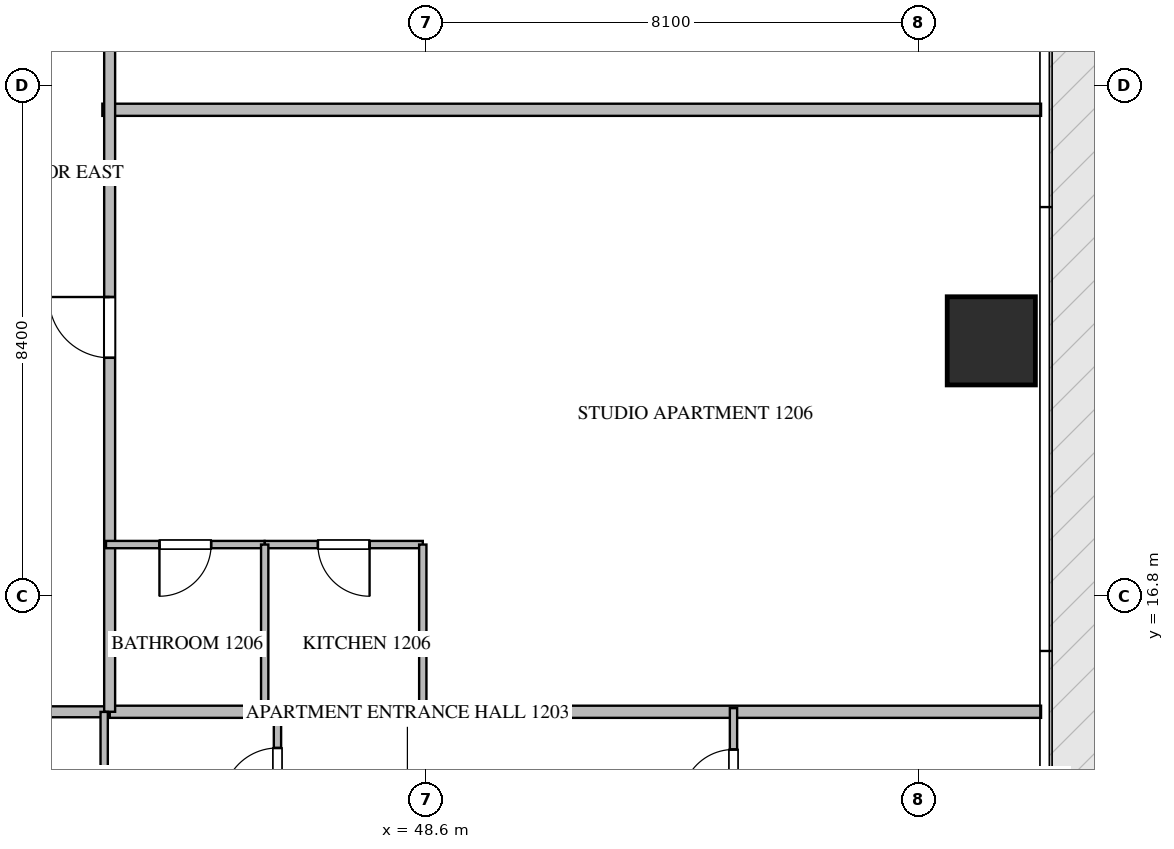
"""IFC4 building model, lengths in metres.
Left out: names, types, materials, properties, quantities, classifications, styles, units other than length and angle.
Written with IfcOpenShell. Run it as: python <this file> out.ifc"""

import sys

from ifc_helpers import new_model, si_unit, direction, frame, frame_2d, origin, origin_2d, place, context, subcontext, project, spatial, rectangle, extrude, source, transform, mapped, element, fill, save


model = new_model("IFC4")
c1 = context("Model", 3, precision=1e-05, world=origin(), true_north=direction((0.0, 1.0)))
c2 = subcontext(c1, "Body", "Model", "MODEL_VIEW")
j1 = project(units=[si_unit("LENGTHUNIT", "METRE"), si_unit("PLANEANGLEUNIT", "RADIAN")], contexts=[c1])
p1 = place(None, origin())
s1 = spatial("IfcSite", under=j1, at=p1, CompositionType="ELEMENT")
p2 = place(p1, origin())
s2 = spatial("IfcBuilding", under=s1, at=p2, CompositionType="ELEMENT")
p3 = place(p2, frame((0.0, 0.0, 52.95)))
s3 = spatial("IfcBuildingStorey", under=s2, at=p3, CompositionType="ELEMENT", Elevation=52.95)
m1 = source(origin(), c2, "Body", "SweptSolid", [
    extrude(rectangle(XDim=1.45, YDim=1.45, at=origin_2d()), origin(), (0.0, 0.0, 1.0), 3.75),
])
p4 = place(p3, frame((57.9, 21.0, -0.26), z_axis=(0.0, 0.0, 1.0), x_axis=(1.0, 0.0, 0.0)))
e1 = element("IfcColumn", 1, at=p4, inside=s3, PredefinedType="COLUMN", context=c2, shape_type="MappedRepresentation", body=[
    mapped(m1, transform((0.0, 0.0, 0.0), scale=1.0)),
])
p5 = place(p3, frame((43.28, 24.8, 0.0), z_axis=(0.0, 0.0, 1.0), x_axis=(1.0, 0.0, 0.0)))
e2 = element("IfcWall", 2, at=p5, inside=s3, PredefinedType="PARTITIONING", context=c2, shape_type="SweptSolid", body=[
    extrude(rectangle(XDim=15.438, YDim=0.2, at=frame_2d((7.719, 0.0))), origin(), (0.0, 0.0, 1.0), 3.49),
])
p6 = place(p3, frame((43.4, 14.9, 0.0), z_axis=(0.0, 0.0, 1.0), x_axis=(1.0, 0.0, 0.0)))
e3 = element("IfcWall", 3, at=p6, inside=s3, PredefinedType="PARTITIONING", context=c2, shape_type="SweptSolid", body=[
    extrude(rectangle(XDim=15.318, YDim=0.2, at=frame_2d((7.659, 0.0))), origin(), (0.0, 0.0, 1.0), 3.49),
])
p7 = place(p3, frame((21.402, 14.9, 0.0), z_axis=(0.0, 0.0, 1.0), x_axis=(1.0, 0.0, 0.0)))
e4 = element("IfcWall", 4, at=p7, inside=s3, PredefinedType="PARTITIONING", context=c2, shape_type="SweptSolid", body=[
    extrude(rectangle(XDim=21.996, YDim=0.18, at=frame_2d((10.998, 0.0))), origin(), (0.0, 0.0, 1.0), 3.49),
])
p8 = place(p7, frame((2.1, 0.0, 0.0)))
e5 = element("IfcOpeningElement", 5, at=p8, cuts=e4, PredefinedType="OPENING", context=c2, shape_type="SweptSolid", body=[
    extrude(rectangle(XDim=1.0, YDim=2.15, at=frame_2d((0.5, 1.075))), frame((0.0, 0.1, 0.0), z_axis=(0.0, -1.0, 0.0), x_axis=(1.0, 0.0, 0.0)), (0.0, 0.0, 1.0), 0.2),
])
p9 = place(p7, frame((14.172, 0.0, 0.0)))
e6 = element("IfcOpeningElement", 6, at=p9, cuts=e4, PredefinedType="OPENING", context=c2, shape_type="SweptSolid", body=[
    extrude(rectangle(XDim=1.0, YDim=2.15, at=frame_2d((0.5, 1.075))), frame((0.0, 0.1, 0.0), z_axis=(0.0, -1.0, 0.0), x_axis=(1.0, 0.0, 0.0)), (0.0, 0.0, 1.0), 0.2),
])
p10 = place(p7, frame((18.896, 0.0, 0.0)))
e7 = element("IfcOpeningElement", 7, at=p10, cuts=e4, PredefinedType="OPENING", context=c2, shape_type="SweptSolid", body=[
    extrude(rectangle(XDim=1.0, YDim=2.15, at=frame_2d((0.5, 1.075))), frame((0.0, 0.1, 0.0), z_axis=(0.0, -1.0, 0.0), x_axis=(1.0, 0.0, 0.0)), (0.0, 0.0, 1.0), 0.2),
])
p11 = place(p3, frame((43.4, 14.9, 0.0), z_axis=(0.0, 0.0, 1.0), x_axis=(0.0, 1.0, 0.0)))
e8 = element("IfcWall", 8, at=p11, inside=s3, PredefinedType="PARTITIONING", context=c2, shape_type="SweptSolid", body=[
    extrude(rectangle(XDim=20.6, YDim=0.18, at=frame_2d((10.3, 0.0))), origin(), (0.0, 0.0, 1.0), 3.49),
])
p12 = place(p11, frame((5.821, 0.0, 0.0)))
e9 = element("IfcOpeningElement", 9, at=p12, cuts=e8, PredefinedType="OPENING", context=c2, shape_type="SweptSolid", body=[
    extrude(rectangle(XDim=1.0, YDim=2.15, at=frame_2d((0.5, 1.075))), frame((0.0, 0.1, 0.0), z_axis=(0.0, -1.0, 0.0), x_axis=(1.0, 0.0, 0.0)), (0.0, 0.0, 1.0), 0.2),
])
p13 = place(p11, frame((10.898, 0.0, 0.0)))
e10 = element("IfcOpeningElement", 10, at=p13, cuts=e8, PredefinedType="OPENING", context=c2, shape_type="SweptSolid", body=[
    extrude(rectangle(XDim=1.0, YDim=2.15, at=frame_2d((0.5, 1.075))), frame((0.0, 0.1, 0.0), z_axis=(0.0, -1.0, 0.0), x_axis=(1.0, 0.0, 0.0)), (0.0, 0.0, 1.0), 0.2),
])
p14 = place(p3, frame((43.31, 12.15, 0.0), z_axis=(0.0, 0.0, 1.0), x_axis=(0.0, 1.0, 0.0)))
e11 = element("IfcWall", 11, at=p14, inside=s3, PredefinedType="PARTITIONING", context=c2, shape_type="SweptSolid", body=[
    extrude(rectangle(XDim=2.748, YDim=0.12, at=frame_2d((1.374, 0.0))), origin(), (0.0, 0.0, 1.0), 3.49),
])
p15 = place(p3, frame((46.16, 12.75, 0.0), z_axis=(0.0, 0.0, 1.0), x_axis=(0.0, 1.0, 0.0)))
e12 = element("IfcWall", 12, at=p15, inside=s3, PredefinedType="PARTITIONING", context=c2, shape_type="SweptSolid", body=[
    extrude(rectangle(XDim=2.21, YDim=0.12, at=frame_2d((1.105, 0.0))), origin(), (0.0, 0.0, 1.0), 3.49),
])
p16 = place(p15, frame((0.655, 0.0, 0.0)))
e13 = element("IfcOpeningElement", 13, at=p16, cuts=e12, PredefinedType="OPENING", context=c2, shape_type="SweptSolid", body=[
    extrude(rectangle(XDim=0.9, YDim=2.1, at=frame_2d((0.45, 1.05))), frame((0.0, 0.07, 0.0), z_axis=(0.0, -1.0, 0.0), x_axis=(1.0, 0.0, 0.0)), (0.0, 0.0, 1.0), 0.14),
])
p17 = place(p3, frame((53.66, 12.75, 0.0), z_axis=(0.0, 0.0, 1.0), x_axis=(0.0, 1.0, 0.0)))
e14 = element("IfcWall", 14, at=p17, inside=s3, PredefinedType="PARTITIONING", context=c2, shape_type="SweptSolid", body=[
    extrude(rectangle(XDim=2.21, YDim=0.12, at=frame_2d((1.105, 0.0))), origin(), (0.0, 0.0, 1.0), 3.49),
])
p18 = place(p17, frame((0.68, 0.0, 0.0)))
e15 = element("IfcOpeningElement", 15, at=p18, cuts=e14, PredefinedType="OPENING", context=c2, shape_type="SweptSolid", body=[
    extrude(rectangle(XDim=0.85, YDim=2.1, at=frame_2d((0.425, 1.05))), frame((0.0, 0.07, 0.0), z_axis=(0.0, -1.0, 0.0), x_axis=(1.0, 0.0, 0.0)), (0.0, 0.0, 1.0), 0.14),
])
p19 = place(p3, frame((48.55, 17.65, 0.0), z_axis=(0.0, 0.0, 1.0), x_axis=(-1.0, 0.0, 0.0)))
e16 = element("IfcWall", 16, at=p19, inside=s3, PredefinedType="PARTITIONING", context=c2, shape_type="SweptSolid", body=[
    extrude(rectangle(XDim=2.6, YDim=0.12, at=frame_2d((1.3, 0.0))), origin(), (0.0, 0.0, 1.0), 3.49),
])
p20 = place(p19, frame((0.875, 0.0, 0.0)))
e17 = element("IfcOpeningElement", 17, at=p20, cuts=e16, PredefinedType="OPENING", context=c2, shape_type="SweptSolid", body=[
    extrude(rectangle(XDim=0.85, YDim=2.1, at=frame_2d((0.425, 1.05))), frame((0.0, 0.07, 0.0), z_axis=(0.0, -1.0, 0.0), x_axis=(1.0, 0.0, 0.0)), (0.0, 0.0, 1.0), 0.14),
])
p21 = place(p3, frame((45.948, 17.65, 0.0), z_axis=(0.0, 0.0, 1.0), x_axis=(-1.0, 0.0, 0.0)))
e18 = element("IfcWall", 18, at=p21, inside=s3, PredefinedType="PARTITIONING", context=c2, shape_type="SweptSolid", body=[
    extrude(rectangle(XDim=2.608, YDim=0.12, at=frame_2d((1.304, 0.0))), origin(), (0.0, 0.0, 1.0), 3.49),
])
p22 = place(p21, frame((0.879, 0.0, 0.0)))
e19 = element("IfcOpeningElement", 19, at=p22, cuts=e18, PredefinedType="OPENING", context=c2, shape_type="SweptSolid", body=[
    extrude(rectangle(XDim=0.85, YDim=2.1, at=frame_2d((0.425, 1.05))), frame((0.0, 0.07, 0.0), z_axis=(0.0, -1.0, 0.0), x_axis=(1.0, 0.0, 0.0)), (0.0, 0.0, 1.0), 0.14),
])
for number, where, z_axis, x_axis in (
    (20, (45.95, 14.84, 0.0), (0.0, 0.0, 1.0), (0.0, 1.0, 0.0)),
    (21, (48.55, 14.84, 0.0), (0.0, 0.0, 1.0), (0.0, 1.0, 0.0)),
):
    element("IfcWall", number, at=place(p3, frame(where, z_axis=z_axis, x_axis=x_axis)), inside=s3, PredefinedType="PARTITIONING", context=c2, shape_type="SweptSolid", body=[
        extrude(rectangle(XDim=2.81, YDim=0.12, at=frame_2d((1.405, 0.0))), origin(), (0.0, 0.0, 1.0), 3.49),
    ])
m2 = source(origin(), c2, "Body", "SweptSolid", [
    extrude(rectangle(XDim=1.0, YDim=2.15, at=frame_2d((0.5, 1.075))), frame((0.0, 0.025, 0.0), z_axis=(0.0, -1.0, 0.0), x_axis=(1.0, 0.0, 0.0)), (0.0, 0.0, 1.0), 0.05),
])
p23 = place(p12, origin())
e22 = element("IfcDoor", 22, at=p23, inside=s3, OperationType="SINGLE_SWING_RIGHT", PredefinedType="DOOR", context=c2, shape_type="MappedRepresentation", body=[
    mapped(m2, transform((0.0, 0.0, 0.0), scale=1.0)),
])
fill(e9, e22)
m3 = source(origin(), c2, "Body", "SweptSolid", [
    extrude(rectangle(XDim=0.9, YDim=2.1, at=frame_2d((0.45, 1.05))), frame((0.0, 0.025, 0.0), z_axis=(0.0, -1.0, 0.0), x_axis=(1.0, 0.0, 0.0)), (0.0, 0.0, 1.0), 0.05),
])
p24 = place(p16, origin())
e23 = element("IfcDoor", 23, at=p24, inside=s3, OperationType="SINGLE_SWING_LEFT", PredefinedType="DOOR", context=c2, shape_type="MappedRepresentation", body=[
    mapped(m3, transform((0.0, 0.0, 0.0), scale=1.0)),
])
fill(e13, e23)
m4 = source(origin(), c2, "Body", "SweptSolid", [
    extrude(rectangle(XDim=0.85, YDim=2.1, at=frame_2d((0.425, 1.05))), frame((0.0, 0.025, 0.0), z_axis=(0.0, -1.0, 0.0), x_axis=(1.0, 0.0, 0.0)), (0.0, 0.0, 1.0), 0.05),
])
p25 = place(p18, origin())
e24 = element("IfcDoor", 24, at=p25, inside=s3, OperationType="SINGLE_SWING_LEFT", PredefinedType="DOOR", context=c2, shape_type="MappedRepresentation", body=[
    mapped(m4, transform((0.0, 0.0, 0.0), scale=1.0)),
])
fill(e15, e24)
p26 = place(p20, origin())
e25 = element("IfcDoor", 25, at=p26, inside=s3, OperationType="SINGLE_SWING_LEFT", PredefinedType="DOOR", context=c2, shape_type="MappedRepresentation", body=[
    mapped(m4, transform((0.0, 0.0, 0.0), scale=1.0)),
])
fill(e17, e25)
p27 = place(p22, origin())
e26 = element("IfcDoor", 26, at=p27, inside=s3, OperationType="SINGLE_SWING_RIGHT", PredefinedType="DOOR", context=c2, shape_type="MappedRepresentation", body=[
    mapped(m4, transform((0.0, 0.0, 0.0), scale=1.0)),
])
fill(e19, e26)
save(model, sys.argv[1])
